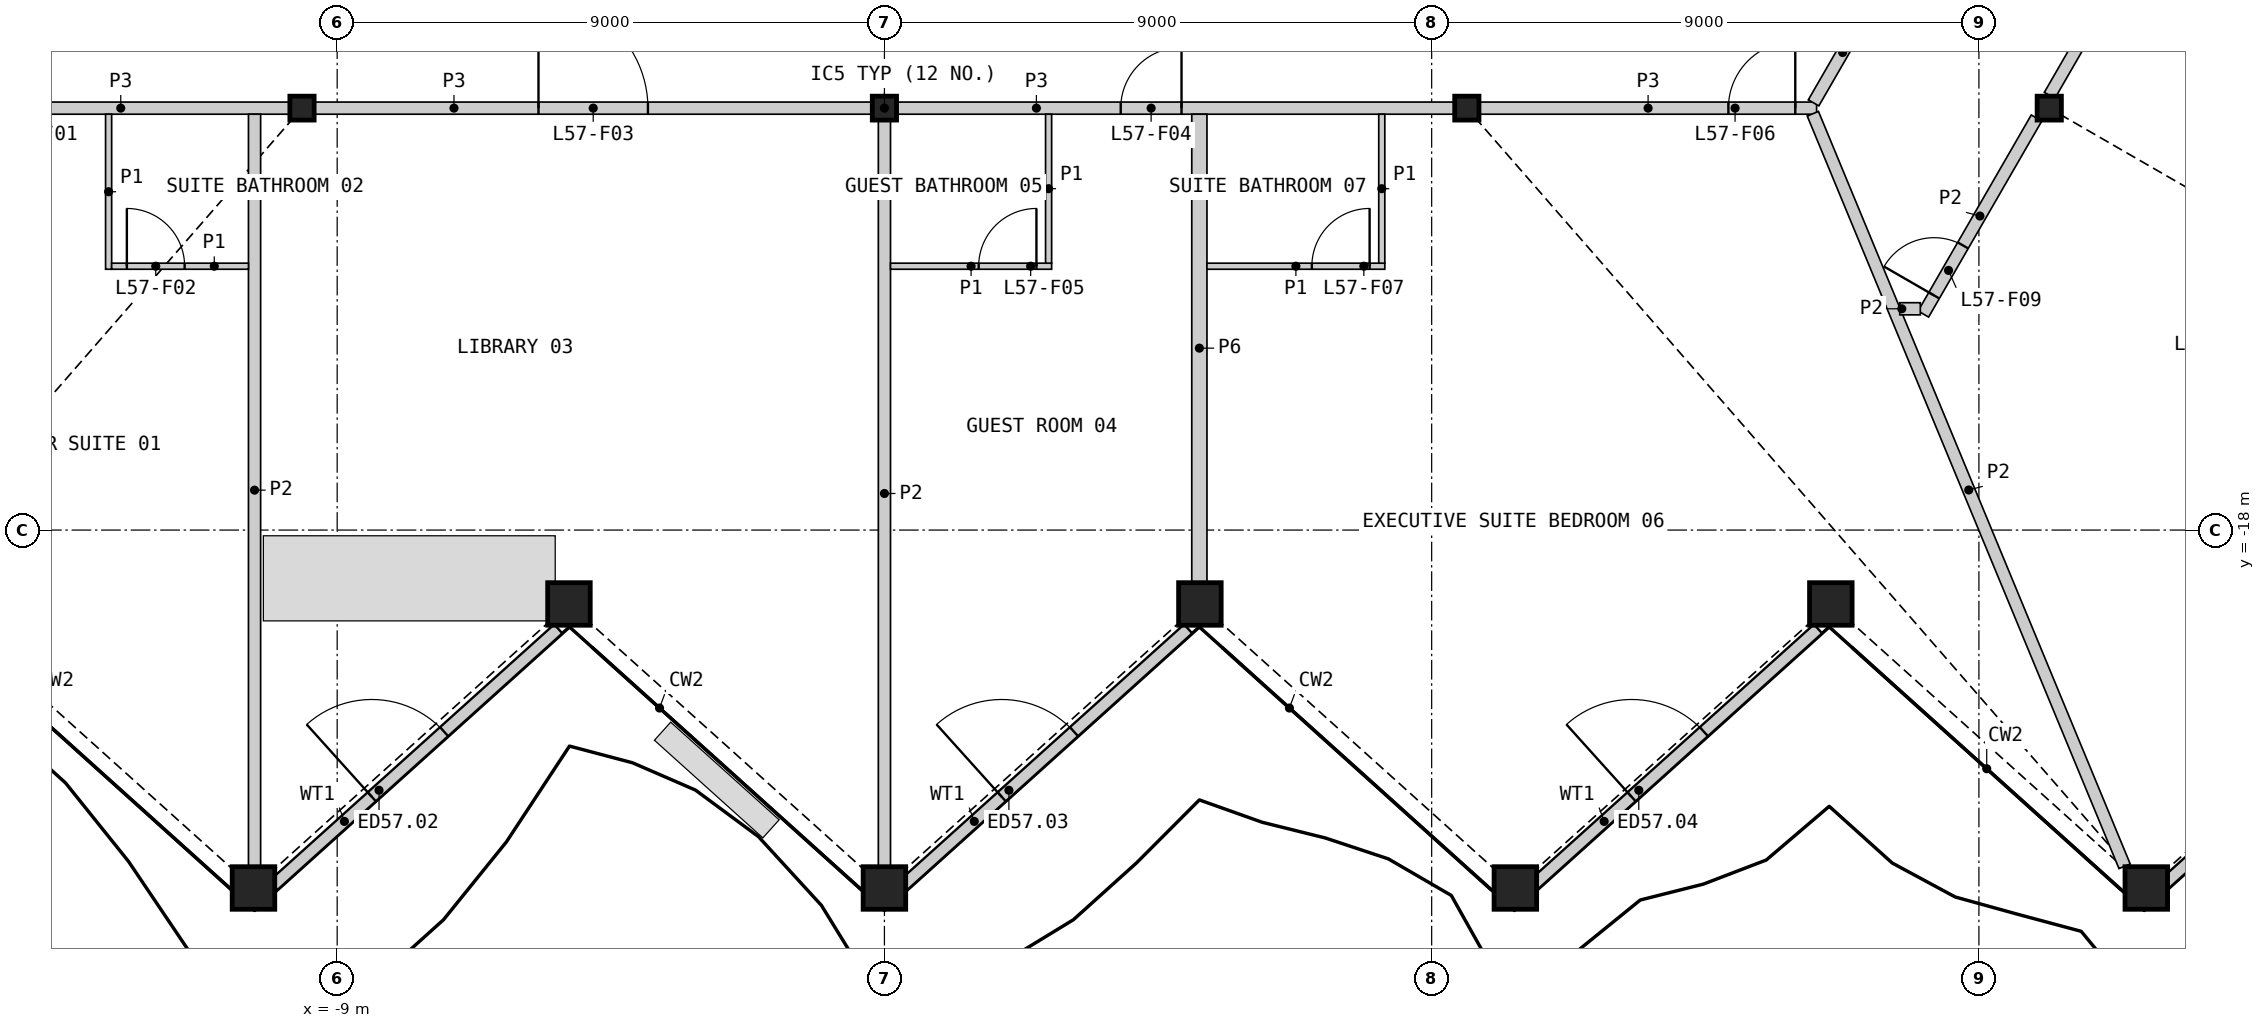
"""IFC4 building model, lengths in metres.
Left out: names, types, materials, properties, quantities, classifications, styles, units other than length and angle.
Written with IfcOpenShell. Run it as: python <this file> out.ifc"""

import sys

from ifc_helpers import new_model, si_unit, direction, frame, frame_2d, origin, origin_2d, place, context, subcontext, project, spatial, rectangle, hollow_rectangle, i_section, extrude, element, fill, save


model = new_model("IFC4")
c1 = context("Model", 3, precision=1e-05, world=origin(), true_north=direction((0.0, 1.0)))
c2 = subcontext(c1, "Body", "Model", "MODEL_VIEW")
j1 = project(units=[si_unit("LENGTHUNIT", "METRE"), si_unit("PLANEANGLEUNIT", "RADIAN")], contexts=[c1])
p1 = place(None, origin())
s1 = spatial("IfcSite", under=j1, at=p1, CompositionType="ELEMENT")
p2 = place(p1, origin())
s2 = spatial("IfcBuilding", under=s1, at=p2, CompositionType="ELEMENT")
p3 = place(p2, frame((0.0, 0.0, 256.2)))
s3 = spatial("IfcBuildingStorey", under=s2, at=p3, CompositionType="ELEMENT", Elevation=256.2)
for number, where, z_axis, x_axis in (
    (1, (-10.376, -23.887, 0.0), (0.0, 0.0, 1.0), (1.0, 0.0, 0.0)),
    (2, (-5.188, -19.215, 0.0), (0.0, 0.0, 1.0), (1.0, 0.0, 0.0)),
    (3, (0.0, -23.887, 0.0), (0.0, 0.0, 1.0), (1.0, 0.0, 0.0)),
    (4, (5.188, -19.215, 0.0), (0.0, 0.0, 1.0), (1.0, 0.0, 0.0)),
    (5, (10.376, -23.887, 0.0), (0.0, 0.0, 1.0), (1.0, 0.0, 0.0)),
    (6, (15.565, -19.215, 0.0), (0.0, 0.0, 1.0), (1.0, 0.0, 0.0)),
    (7, (20.753, -23.887, 0.0), (0.0, 0.0, 1.0), (1.0, 0.0, 0.0)),
):
    element("IfcColumn", number, at=place(p3, frame(where, z_axis=z_axis, x_axis=x_axis)), inside=s3, PredefinedType="COLUMN", context=c2, shape_type="SweptSolid", body=[
        extrude(hollow_rectangle(XDim=0.7, YDim=0.7, WallThickness=0.045, at=origin_2d()), origin(), (0.0, 0.0, 1.0), 3.6),
    ])
for number, where, z_axis, x_axis in (
    (8, (-9.578, -11.06, 0.0), (0.0, 0.0, 1.0), (1.0, 0.0, 0.0)),
    (9, (0.0, -11.06, 0.0), (0.0, 0.0, 1.0), (1.0, 0.0, 0.0)),
    (10, (9.578, -11.06, 0.0), (0.0, 0.0, 1.0), (1.0, 0.0, 0.0)),
    (11, (19.157, -11.06, 0.0), (0.0, 0.0, 1.0), (1.0, 0.0, 0.0)),
):
    element("IfcColumn", number, at=place(p3, frame(where, z_axis=z_axis, x_axis=x_axis)), inside=s3, PredefinedType="COLUMN", context=c2, shape_type="SweptSolid", body=[
        extrude(i_section(OverallWidth=0.399, OverallDepth=0.393, WebThickness=0.023, FlangeThickness=0.037, at=origin_2d()), origin(), (0.0, 0.0, 1.0), 3.6),
    ])
p4 = place(p3, frame((-10.054, -23.848, 0.0), z_axis=(0.0, 0.0, 1.0), x_axis=(0.74314024121, 0.669135697668, 0.0)))
e12 = element("IfcWall", 12, at=p4, inside=s3, PredefinedType="SOLIDWALL", context=c2, shape_type="SweptSolid", body=[
    extrude(rectangle(XDim=6.311, YDim=0.2, at=frame_2d((3.156, 0.0))), origin(), (0.0, 0.0, 1.0), 2.701),
])
p5 = place(p4, frame((2.184, 0.0, 0.0)))
e13 = element("IfcOpeningElement", 13, at=p5, cuts=e12, PredefinedType="OPENING", context=c2, shape_type="SweptSolid", body=[
    extrude(rectangle(XDim=1.6, YDim=2.4, at=frame_2d((0.8, 1.2))), frame((0.0, 0.11, 0.0), z_axis=(0.0, -1.0, 0.0), x_axis=(1.0, 0.0, 0.0)), (0.0, 0.0, 1.0), 0.22),
])
p6 = place(p3, frame((0.305, -23.848, 0.0), z_axis=(0.0, 0.0, 1.0), x_axis=(0.74314024121, 0.669135697668, 0.0)))
e14 = element("IfcWall", 14, at=p6, inside=s3, PredefinedType="SOLIDWALL", context=c2, shape_type="SweptSolid", body=[
    extrude(rectangle(XDim=6.311, YDim=0.2, at=frame_2d((3.156, 0.0))), origin(), (0.0, 0.0, 1.0), 2.701),
])
p7 = place(p6, frame((2.184, 0.0, 0.0)))
e15 = element("IfcOpeningElement", 15, at=p7, cuts=e14, PredefinedType="OPENING", context=c2, shape_type="SweptSolid", body=[
    extrude(rectangle(XDim=1.6, YDim=2.4, at=frame_2d((0.8, 1.2))), frame((0.0, 0.11, 0.0), z_axis=(0.0, -1.0, 0.0), x_axis=(1.0, 0.0, 0.0)), (0.0, 0.0, 1.0), 0.22),
])
p8 = place(p3, frame((10.664, -23.848, 0.0), z_axis=(0.0, 0.0, 1.0), x_axis=(0.74314024121, 0.669135697668, 0.0)))
e16 = element("IfcWall", 16, at=p8, inside=s3, PredefinedType="SOLIDWALL", context=c2, shape_type="SweptSolid", body=[
    extrude(rectangle(XDim=6.311, YDim=0.2, at=frame_2d((3.156, 0.0))), origin(), (0.0, 0.0, 1.0), 2.701),
])
p9 = place(p8, frame((2.184, 0.0, 0.0)))
e17 = element("IfcOpeningElement", 17, at=p9, cuts=e16, PredefinedType="OPENING", context=c2, shape_type="SweptSolid", body=[
    extrude(rectangle(XDim=1.6, YDim=2.4, at=frame_2d((0.8, 1.2))), frame((0.0, 0.11, 0.0), z_axis=(0.0, -1.0, 0.0), x_axis=(1.0, 0.0, 0.0)), (0.0, 0.0, 1.0), 0.22),
])
p10 = place(p3, frame((21.023, -23.848, 0.0), z_axis=(0.0, 0.0, 1.0), x_axis=(0.74314024121, 0.669135697668, 0.0)))
e18 = element("IfcWall", 18, at=p10, inside=s3, PredefinedType="SOLIDWALL", context=c2, shape_type="SweptSolid", body=[
    extrude(rectangle(XDim=6.311, YDim=0.2, at=frame_2d((3.156, 0.0))), origin(), (0.0, 0.0, 1.0), 2.701),
])
p11 = place(p10, frame((2.184, 0.0, 0.0)))
e19 = element("IfcOpeningElement", 19, at=p11, cuts=e18, PredefinedType="OPENING", context=c2, shape_type="SweptSolid", body=[
    extrude(rectangle(XDim=1.6, YDim=2.4, at=frame_2d((0.8, 1.2))), frame((0.0, 0.11, 0.0), z_axis=(0.0, -1.0, 0.0), x_axis=(1.0, 0.0, 0.0)), (0.0, 0.0, 1.0), 0.22),
])
p12 = place(p3, frame((-9.369, -11.06, 0.0), z_axis=(0.0, 0.0, 1.0), x_axis=(1.0, 0.0, 0.0)))
e20 = element("IfcWall", 20, at=p12, inside=s3, PredefinedType="PARTITIONING", context=c2, shape_type="SweptSolid", body=[
    extrude(rectangle(XDim=9.159, YDim=0.2, at=frame_2d((4.58, 0.0))), origin(), (0.0, 0.0, 1.0), 3.25),
])
p13 = place(p12, frame((3.68, 0.0, 0.0)))
e21 = element("IfcOpeningElement", 21, at=p13, cuts=e20, PredefinedType="OPENING", context=c2, shape_type="SweptSolid", body=[
    extrude(rectangle(XDim=1.8, YDim=2.1, at=frame_2d((0.9, 1.05))), frame((0.0, 0.11, 0.0), z_axis=(0.0, -1.0, 0.0), x_axis=(1.0, 0.0, 0.0)), (0.0, 0.0, 1.0), 0.22),
])
p14 = place(p3, frame((0.209, -11.06, 0.0), z_axis=(0.0, 0.0, 1.0), x_axis=(1.0, 0.0, 0.0)))
e22 = element("IfcWall", 22, at=p14, inside=s3, PredefinedType="PARTITIONING", context=c2, shape_type="SweptSolid", body=[
    extrude(rectangle(XDim=9.159, YDim=0.2, at=frame_2d((4.58, 0.0))), origin(), (0.0, 0.0, 1.0), 3.25),
])
p15 = place(p14, frame((3.677, 0.0, 0.0)))
e23 = element("IfcOpeningElement", 23, at=p15, cuts=e22, PredefinedType="OPENING", context=c2, shape_type="SweptSolid", body=[
    extrude(rectangle(XDim=1.0, YDim=2.1, at=frame_2d((0.5, 1.05))), frame((0.0, 0.11, 0.0), z_axis=(0.0, -1.0, 0.0), x_axis=(1.0, 0.0, 0.0)), (0.0, 0.0, 1.0), 0.22),
])
p16 = place(p3, frame((5.179, -18.855, 0.0), z_axis=(0.0, 0.0, 1.0), x_axis=(0.0, 1.0, 0.0)))
e24 = element("IfcWall", 24, at=p16, inside=s3, PredefinedType="PARTITIONING", context=c2, shape_type="SweptSolid", body=[
    extrude(rectangle(XDim=7.695, YDim=0.25, at=frame_2d((3.848, 0.0))), origin(), (0.0, 0.0, 1.0), 2.404),
])
p17 = place(p3, frame((9.788, -11.06, 0.0), z_axis=(0.0, 0.0, 1.0), x_axis=(1.0, 0.0, 0.0)))
e25 = element("IfcWall", 25, at=p17, inside=s3, PredefinedType="PARTITIONING", context=c2, shape_type="SweptSolid", body=[
    extrude(rectangle(XDim=5.543, YDim=0.2, at=frame_2d((2.771, 0.0))), origin(), (0.0, 0.0, 1.0), 3.25),
])
p18 = place(p17, frame((4.092, 0.0, 0.0)))
e26 = element("IfcOpeningElement", 26, at=p18, cuts=e25, PredefinedType="OPENING", context=c2, shape_type="SweptSolid", body=[
    extrude(rectangle(XDim=1.1, YDim=2.1, at=frame_2d((0.55, 1.05))), frame((0.0, 0.11, 0.0), z_axis=(0.0, -1.0, 0.0), x_axis=(1.0, 0.0, 0.0)), (0.0, 0.0, 1.0), 0.22),
])
p19 = place(p3, frame((-15.331, -11.06, 0.0), z_axis=(0.0, 0.0, 1.0), x_axis=(1.0, 0.0, 0.0)))
e27 = element("IfcWall", 27, at=p19, inside=s3, PredefinedType="PARTITIONING", context=c2, shape_type="SweptSolid", body=[
    extrude(rectangle(XDim=5.543, YDim=0.2, at=frame_2d((2.771, 0.0))), origin(), (0.0, 0.0, 1.0), 3.25),
])
p20 = place(p19, frame((0.403, 0.0, 0.0)))
e28 = element("IfcOpeningElement", 28, at=p20, cuts=e27, PredefinedType="OPENING", context=c2, shape_type="SweptSolid", body=[
    extrude(rectangle(XDim=1.1, YDim=2.1, at=frame_2d((0.55, 1.05))), frame((0.0, 0.11, 0.0), z_axis=(0.0, -1.0, 0.0), x_axis=(1.0, 0.0, 0.0)), (0.0, 0.0, 1.0), 0.22),
])
p21 = place(p3, frame((15.281, -10.974, 0.0), z_axis=(0.0, 0.0, 1.0), x_axis=(0.499989446428, 0.866031496806, 0.0)))
e29 = element("IfcWall", 29, at=p21, inside=s3, PredefinedType="PARTITIONING", context=c2, shape_type="SweptSolid", body=[
    extrude(rectangle(XDim=3.826, YDim=0.2, at=frame_2d((1.913, 0.0))), origin(), (0.0, 0.0, 1.0), 3.25),
])
p22 = place(p21, frame((1.386, 0.0, 0.0)))
e30 = element("IfcOpeningElement", 30, at=p22, cuts=e29, PredefinedType="OPENING", context=c2, shape_type="SweptSolid", body=[
    extrude(rectangle(XDim=0.95, YDim=2.1, at=frame_2d((0.475, 1.05))), frame((0.0, 0.11, 0.0), z_axis=(0.0, -1.0, 0.0), x_axis=(1.0, 0.0, 0.0)), (0.0, 0.0, 1.0), 0.22),
])
p23 = place(p3, frame((15.269, -11.153, 0.0), z_axis=(0.0, 0.0, 1.0), x_axis=(0.382692998932, -0.923875569851, 0.0)))
e31 = element("IfcWall", 31, at=p23, inside=s3, PredefinedType="PARTITIONING", context=c2, shape_type="SweptSolid", body=[
    extrude(rectangle(XDim=13.397, YDim=0.2, at=frame_2d((6.698, 0.0))), origin(), (0.0, 0.0, 1.0), 2.404),
])
p24 = place(p3, frame((-10.359, -23.527, 0.0), z_axis=(0.0, 0.0, 1.0), x_axis=(0.0, 1.0, 0.0)))
e32 = element("IfcWall", 32, at=p24, inside=s3, PredefinedType="PARTITIONING", context=c2, shape_type="SweptSolid", body=[
    extrude(rectangle(XDim=12.366, YDim=0.2, at=frame_2d((6.183, 0.0))), origin(), (0.0, 0.0, 1.0), 2.404),
])
p25 = place(p3, frame((0.0, -23.527, 0.0), z_axis=(0.0, 0.0, 1.0), x_axis=(0.0, 1.0, 0.0)))
e33 = element("IfcWall", 33, at=p25, inside=s3, PredefinedType="PARTITIONING", context=c2, shape_type="SweptSolid", body=[
    extrude(rectangle(XDim=12.257, YDim=0.2, at=frame_2d((6.128, 0.0))), origin(), (0.0, 0.0, 1.0), 2.404),
])
p26 = place(p3, frame((19.162, -10.851, 0.0), z_axis=(0.0, 0.0, 1.0), x_axis=(0.500008654708, 0.866020406929, 0.0)))
e34 = element("IfcWall", 34, at=p26, inside=s3, PredefinedType="PARTITIONING", context=c2, shape_type="SweptSolid", body=[
    extrude(rectangle(XDim=6.67, YDim=0.2, at=frame_2d((3.335, 0.0))), origin(), (0.0, 0.0, 1.0), 2.404),
])
p27 = place(p3, frame((17.086, -14.447, 0.0), z_axis=(0.0, 0.0, 1.0), x_axis=(0.500004411858, 0.866022856582, 0.0)))
e35 = element("IfcWall", 35, at=p27, inside=s3, PredefinedType="PARTITIONING", context=c2, shape_type="SweptSolid", body=[
    extrude(rectangle(XDim=3.723, YDim=0.2, at=frame_2d((1.861, 0.0))), origin(), (0.0, 0.0, 1.0), 2.404),
])
p28 = place(p27, frame((0.353, 0.0, 0.0)))
e36 = element("IfcOpeningElement", 36, at=p28, cuts=e35, PredefinedType="OPENING", context=c2, shape_type="SweptSolid", body=[
    extrude(rectangle(XDim=0.95, YDim=2.1, at=frame_2d((0.475, 1.05))), frame((0.0, 0.11, 0.0), z_axis=(0.0, -1.0, 0.0), x_axis=(1.0, 0.0, 0.0)), (0.0, 0.0, 1.0), 0.22),
])
p29 = place(p3, frame((16.698, -14.36, 0.0), z_axis=(0.0, 0.0, 1.0), x_axis=(1.0, 0.0, 0.0)))
e37 = element("IfcWall", 37, at=p29, inside=s3, PredefinedType="PARTITIONING", context=c2, shape_type="SweptSolid", body=[
    extrude(rectangle(XDim=0.338, YDim=0.2, at=frame_2d((0.169, 0.0))), origin(), (0.0, 0.0, 1.0), 2.404),
])
p30 = place(p3, frame((5.304, -13.66, 0.0), z_axis=(0.0, 0.0, 1.0), x_axis=(1.0, 0.0, 0.0)))
e38 = element("IfcWall", 38, at=p30, inside=s3, PredefinedType="PARTITIONING", context=c2, shape_type="SweptSolid", body=[
    extrude(rectangle(XDim=2.925, YDim=0.1, at=frame_2d((1.462, 0.0))), origin(), (0.0, 0.0, 1.0), 2.404),
])
p31 = place(p30, frame((1.725, 0.0, 0.0)))
e39 = element("IfcOpeningElement", 39, at=p31, cuts=e38, PredefinedType="OPENING", context=c2, shape_type="SweptSolid", body=[
    extrude(rectangle(XDim=0.95, YDim=2.1, at=frame_2d((0.475, 1.05))), frame((0.0, 0.06, 0.0), z_axis=(0.0, -1.0, 0.0), x_axis=(1.0, 0.0, 0.0)), (0.0, 0.0, 1.0), 0.12),
])
p32 = place(p3, frame((0.1, -13.66, 0.0), z_axis=(0.0, 0.0, 1.0), x_axis=(1.0, 0.0, 0.0)))
e40 = element("IfcWall", 40, at=p32, inside=s3, PredefinedType="PARTITIONING", context=c2, shape_type="SweptSolid", body=[
    extrude(rectangle(XDim=2.65, YDim=0.1, at=frame_2d((1.325, 0.0))), origin(), (0.0, 0.0, 1.0), 2.404),
])
p33 = place(p32, frame((1.45, 0.0, 0.0)))
e41 = element("IfcOpeningElement", 41, at=p33, cuts=e40, PredefinedType="OPENING", context=c2, shape_type="SweptSolid", body=[
    extrude(rectangle(XDim=0.95, YDim=2.1, at=frame_2d((0.475, 1.05))), frame((0.0, 0.06, 0.0), z_axis=(0.0, -1.0, 0.0), x_axis=(1.0, 0.0, 0.0)), (0.0, 0.0, 1.0), 0.12),
])
p34 = place(p3, frame((-12.759, -13.71, 0.0), z_axis=(0.0, 0.0, 1.0), x_axis=(0.0, 1.0, 0.0)))
e42 = element("IfcWall", 42, at=p34, inside=s3, PredefinedType="PARTITIONING", context=c2, shape_type="SweptSolid", body=[
    extrude(rectangle(XDim=2.55, YDim=0.1, at=frame_2d((1.275, 0.0))), origin(), (0.0, 0.0, 1.0), 2.404),
])
for number, where, z_axis, x_axis in (
    (43, (2.7, -13.61, 0.0), (0.0, 0.0, 1.0), (0.0, 1.0, 0.0)),
    (44, (8.179, -13.61, 0.0), (0.0, 0.0, 1.0), (0.0, 1.0, 0.0)),
):
    element("IfcWall", number, at=place(p3, frame(where, z_axis=z_axis, x_axis=x_axis)), inside=s3, PredefinedType="PARTITIONING", context=c2, shape_type="SweptSolid", body=[
        extrude(rectangle(XDim=2.45, YDim=0.1, at=frame_2d((1.225, 0.0))), origin(), (0.0, 0.0, 1.0), 2.404),
    ])
p35 = place(p3, frame((-12.709, -13.66, 0.0), z_axis=(0.0, 0.0, 1.0), x_axis=(1.0, 0.0, 0.0)))
e45 = element("IfcWall", 45, at=p35, inside=s3, PredefinedType="PARTITIONING", context=c2, shape_type="SweptSolid", body=[
    extrude(rectangle(XDim=2.25, YDim=0.1, at=frame_2d((1.125, 0.0))), origin(), (0.0, 0.0, 1.0), 2.404),
])
p36 = place(p35, frame((0.25, 0.0, 0.0)))
e46 = element("IfcOpeningElement", 46, at=p36, cuts=e45, PredefinedType="OPENING", context=c2, shape_type="SweptSolid", body=[
    extrude(rectangle(XDim=0.95, YDim=2.1, at=frame_2d((0.475, 1.05))), frame((0.0, 0.06, 0.0), z_axis=(0.0, -1.0, 0.0), x_axis=(1.0, 0.0, 0.0)), (0.0, 0.0, 1.0), 0.12),
])
p37 = place(p5, origin())
e47 = element("IfcDoor", 47, at=p37, inside=s3, OperationType="DOUBLE_DOOR_SINGLE_SWING", PredefinedType="DOOR", context=c2, shape_type="SweptSolid", body=[
    extrude(rectangle(XDim=1.6, YDim=2.4, at=frame_2d((0.8, 1.2))), frame((0.0, 0.025, 0.0), z_axis=(0.0, -1.0, 0.0), x_axis=(1.0, 0.0, 0.0)), (0.0, 0.0, 1.0), 0.05),
])
fill(e13, e47)
p38 = place(p7, origin())
e48 = element("IfcDoor", 48, at=p38, inside=s3, OperationType="DOUBLE_DOOR_SINGLE_SWING", PredefinedType="DOOR", context=c2, shape_type="SweptSolid", body=[
    extrude(rectangle(XDim=1.6, YDim=2.4, at=frame_2d((0.8, 1.2))), frame((0.0, 0.025, 0.0), z_axis=(0.0, -1.0, 0.0), x_axis=(1.0, 0.0, 0.0)), (0.0, 0.0, 1.0), 0.05),
])
fill(e15, e48)
p39 = place(p9, origin())
e49 = element("IfcDoor", 49, at=p39, inside=s3, OperationType="DOUBLE_DOOR_SINGLE_SWING", PredefinedType="DOOR", context=c2, shape_type="SweptSolid", body=[
    extrude(rectangle(XDim=1.6, YDim=2.4, at=frame_2d((0.8, 1.2))), frame((0.0, 0.025, 0.0), z_axis=(0.0, -1.0, 0.0), x_axis=(1.0, 0.0, 0.0)), (0.0, 0.0, 1.0), 0.05),
])
fill(e17, e49)
p40 = place(p36, origin())
e50 = element("IfcDoor", 50, at=p40, inside=s3, OperationType="SINGLE_SWING_LEFT", PredefinedType="DOOR", context=c2, shape_type="SweptSolid", body=[
    extrude(rectangle(XDim=0.95, YDim=2.1, at=frame_2d((0.475, 1.05))), frame((0.0, 0.025, 0.0), z_axis=(0.0, -1.0, 0.0), x_axis=(1.0, 0.0, 0.0)), (0.0, 0.0, 1.0), 0.05),
])
fill(e46, e50)
p41 = place(p13, origin())
e51 = element("IfcDoor", 51, at=p41, inside=s3, OperationType="DOUBLE_DOOR_SINGLE_SWING", PredefinedType="DOOR", context=c2, shape_type="SweptSolid", body=[
    extrude(rectangle(XDim=1.8, YDim=2.1, at=frame_2d((0.9, 1.05))), frame((0.0, 0.025, 0.0), z_axis=(0.0, -1.0, 0.0), x_axis=(1.0, 0.0, 0.0)), (0.0, 0.0, 1.0), 0.05),
])
fill(e21, e51)
p42 = place(p15, origin())
e52 = element("IfcDoor", 52, at=p42, inside=s3, OperationType="SINGLE_SWING_RIGHT", PredefinedType="DOOR", context=c2, shape_type="SweptSolid", body=[
    extrude(rectangle(XDim=1.0, YDim=2.1, at=frame_2d((0.5, 1.05))), frame((0.0, 0.025, 0.0), z_axis=(0.0, -1.0, 0.0), x_axis=(1.0, 0.0, 0.0)), (0.0, 0.0, 1.0), 0.05),
])
fill(e23, e52)
p43 = place(p33, origin())
e53 = element("IfcDoor", 53, at=p43, inside=s3, OperationType="SINGLE_SWING_RIGHT", PredefinedType="DOOR", context=c2, shape_type="SweptSolid", body=[
    extrude(rectangle(XDim=0.95, YDim=2.1, at=frame_2d((0.475, 1.05))), frame((0.0, 0.025, 0.0), z_axis=(0.0, -1.0, 0.0), x_axis=(1.0, 0.0, 0.0)), (0.0, 0.0, 1.0), 0.05),
])
fill(e41, e53)
p44 = place(p18, origin())
e54 = element("IfcDoor", 54, at=p44, inside=s3, OperationType="SINGLE_SWING_RIGHT", PredefinedType="DOOR", context=c2, shape_type="SweptSolid", body=[
    extrude(rectangle(XDim=1.1, YDim=2.1, at=frame_2d((0.55, 1.05))), frame((0.0, 0.025, 0.0), z_axis=(0.0, -1.0, 0.0), x_axis=(1.0, 0.0, 0.0)), (0.0, 0.0, 1.0), 0.05),
])
fill(e26, e54)
p45 = place(p31, origin())
e55 = element("IfcDoor", 55, at=p45, inside=s3, OperationType="SINGLE_SWING_RIGHT", PredefinedType="DOOR", context=c2, shape_type="SweptSolid", body=[
    extrude(rectangle(XDim=0.95, YDim=2.1, at=frame_2d((0.475, 1.05))), frame((0.0, 0.025, 0.0), z_axis=(0.0, -1.0, 0.0), x_axis=(1.0, 0.0, 0.0)), (0.0, 0.0, 1.0), 0.05),
])
fill(e39, e55)
p46 = place(p28, origin())
e56 = element("IfcDoor", 56, at=p46, inside=s3, OperationType="SINGLE_SWING_LEFT", PredefinedType="DOOR", context=c2, shape_type="SweptSolid", body=[
    extrude(rectangle(XDim=0.95, YDim=2.1, at=frame_2d((0.475, 1.05))), frame((0.0, 0.025, 0.0), z_axis=(0.0, -1.0, 0.0), x_axis=(1.0, 0.0, 0.0)), (0.0, 0.0, 1.0), 0.05),
])
fill(e36, e56)
save(model, sys.argv[1])
